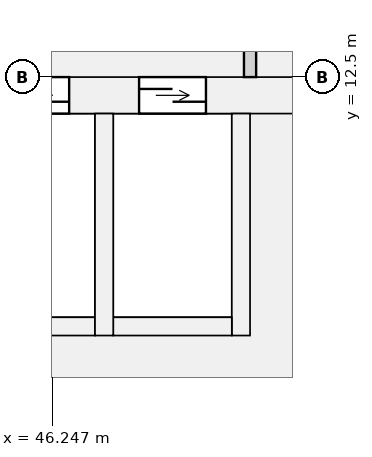
"""IFC4 building model, lengths in metres.
Left out: names, types, materials, properties, quantities, classifications, styles, units other than length and angle.
Written with IfcOpenShell. Run it as: python <this file> out.ifc"""

import sys

from ifc_helpers import new_model, si_unit, direction, frame, frame_2d, origin, place, context, subcontext, project, spatial, rectangle, extrude, element, fill, save


model = new_model("IFC4")
c1 = context("Model", 3, precision=1e-05, world=origin(), true_north=direction((0.0, 1.0)))
c2 = subcontext(c1, "Body", "Model", "MODEL_VIEW")
j1 = project(units=[si_unit("LENGTHUNIT", "METRE"), si_unit("PLANEANGLEUNIT", "RADIAN")], contexts=[c1])
p1 = place(None, origin())
s1 = spatial("IfcSite", under=j1, at=p1, CompositionType="ELEMENT")
p2 = place(p1, origin())
s2 = spatial("IfcBuilding", under=s1, at=p2, CompositionType="ELEMENT")
p3 = place(p2, frame((0.0, 0.0, 77.25)))
s3 = spatial("IfcBuildingStorey", under=s2, at=p3, CompositionType="ELEMENT", Elevation=77.25)
p4 = place(p3, frame((18.8, 12.2, 0.0), z_axis=(0.0, 0.0, 1.0), x_axis=(1.0, 0.0, 0.0)))
e1 = element("IfcWall", 1, at=p4, inside=s3, PredefinedType="SHEAR", context=c2, shape_type="SweptSolid", body=[
    extrude(rectangle(XDim=34.4, YDim=0.6, at=frame_2d((17.2, 0.0))), origin(), (0.0, 0.0, 1.0), 6.3),
])
p5 = place(p4, frame((4.675, 0.0, 0.0)))
e2 = element("IfcOpeningElement", 2, at=p5, cuts=e1, PredefinedType="OPENING", context=c2, shape_type="SweptSolid", body=[
    extrude(rectangle(XDim=1.2, YDim=2.1, at=frame_2d((0.6, 1.05))), frame((0.0, 0.31, 0.0), z_axis=(0.0, -1.0, 0.0), x_axis=(1.0, 0.0, 0.0)), (0.0, 0.0, 1.0), 0.62),
])
p6 = place(p4, frame((7.525, 0.0, 0.0)))
e3 = element("IfcOpeningElement", 3, at=p6, cuts=e1, PredefinedType="OPENING", context=c2, shape_type="SweptSolid", body=[
    extrude(rectangle(XDim=1.2, YDim=2.1, at=frame_2d((0.6, 1.05))), frame((0.0, 0.31, 0.0), z_axis=(0.0, -1.0, 0.0), x_axis=(1.0, 0.0, 0.0)), (0.0, 0.0, 1.0), 0.62),
])
p7 = place(p4, frame((10.375, 0.0, 0.0)))
e4 = element("IfcOpeningElement", 4, at=p7, cuts=e1, PredefinedType="OPENING", context=c2, shape_type="SweptSolid", body=[
    extrude(rectangle(XDim=1.2, YDim=2.1, at=frame_2d((0.6, 1.05))), frame((0.0, 0.31, 0.0), z_axis=(0.0, -1.0, 0.0), x_axis=(1.0, 0.0, 0.0)), (0.0, 0.0, 1.0), 0.62),
])
p8 = place(p4, frame((13.225, 0.0, 0.0)))
e5 = element("IfcOpeningElement", 5, at=p8, cuts=e1, PredefinedType="OPENING", context=c2, shape_type="SweptSolid", body=[
    extrude(rectangle(XDim=1.2, YDim=2.1, at=frame_2d((0.6, 1.05))), frame((0.0, 0.31, 0.0), z_axis=(0.0, -1.0, 0.0), x_axis=(1.0, 0.0, 0.0)), (0.0, 0.0, 1.0), 0.62),
])
p9 = place(p4, frame((16.075, 0.0, 0.0)))
e6 = element("IfcOpeningElement", 6, at=p9, cuts=e1, PredefinedType="OPENING", context=c2, shape_type="SweptSolid", body=[
    extrude(rectangle(XDim=1.2, YDim=2.1, at=frame_2d((0.6, 1.05))), frame((0.0, 0.31, 0.0), z_axis=(0.0, -1.0, 0.0), x_axis=(1.0, 0.0, 0.0)), (0.0, 0.0, 1.0), 0.62),
])
p10 = place(p4, frame((18.925, 0.0, 0.0)))
e7 = element("IfcOpeningElement", 7, at=p10, cuts=e1, PredefinedType="OPENING", context=c2, shape_type="SweptSolid", body=[
    extrude(rectangle(XDim=1.2, YDim=2.1, at=frame_2d((0.6, 1.05))), frame((0.0, 0.31, 0.0), z_axis=(0.0, -1.0, 0.0), x_axis=(1.0, 0.0, 0.0)), (0.0, 0.0, 1.0), 0.62),
])
p11 = place(p4, frame((21.775, 0.0, 0.0)))
e8 = element("IfcOpeningElement", 8, at=p11, cuts=e1, PredefinedType="OPENING", context=c2, shape_type="SweptSolid", body=[
    extrude(rectangle(XDim=1.2, YDim=2.1, at=frame_2d((0.6, 1.05))), frame((0.0, 0.31, 0.0), z_axis=(0.0, -1.0, 0.0), x_axis=(1.0, 0.0, 0.0)), (0.0, 0.0, 1.0), 0.62),
])
p12 = place(p4, frame((24.375, 0.0, 0.0)))
e9 = element("IfcOpeningElement", 9, at=p12, cuts=e1, PredefinedType="OPENING", context=c2, shape_type="SweptSolid", body=[
    extrude(rectangle(XDim=1.1, YDim=2.1, at=frame_2d((0.55, 1.05))), frame((0.0, 0.31, 0.0), z_axis=(0.0, -1.0, 0.0), x_axis=(1.0, 0.0, 0.0)), (0.0, 0.0, 1.0), 0.62),
])
p13 = place(p4, frame((26.625, 0.0, 0.0)))
e10 = element("IfcOpeningElement", 10, at=p13, cuts=e1, PredefinedType="OPENING", context=c2, shape_type="SweptSolid", body=[
    extrude(rectangle(XDim=1.1, YDim=2.1, at=frame_2d((0.55, 1.05))), frame((0.0, 0.31, 0.0), z_axis=(0.0, -1.0, 0.0), x_axis=(1.0, 0.0, 0.0)), (0.0, 0.0, 1.0), 0.62),
])
p14 = place(p4, frame((28.875, 0.0, 0.0)))
e11 = element("IfcOpeningElement", 11, at=p14, cuts=e1, PredefinedType="OPENING", context=c2, shape_type="SweptSolid", body=[
    extrude(rectangle(XDim=1.1, YDim=2.1, at=frame_2d((0.55, 1.05))), frame((0.0, 0.31, 0.0), z_axis=(0.0, -1.0, 0.0), x_axis=(1.0, 0.0, 0.0)), (0.0, 0.0, 1.0), 0.62),
])
p15 = place(p4, frame((1.35, 0.0, 0.0)))
e12 = element("IfcOpeningElement", 12, at=p15, cuts=e1, PredefinedType="OPENING", context=c2, shape_type="SweptSolid", body=[
    extrude(rectangle(XDim=1.2, YDim=2.1, at=frame_2d((0.6, 1.05))), frame((0.0, 0.31, 0.0), z_axis=(0.0, -1.0, 0.0), x_axis=(1.0, 0.0, 0.0)), (0.0, 0.0, 1.0), 0.62),
])
p16 = place(p4, frame((31.85, 0.0, 0.0)))
e13 = element("IfcOpeningElement", 13, at=p16, cuts=e1, PredefinedType="OPENING", context=c2, shape_type="SweptSolid", body=[
    extrude(rectangle(XDim=1.2, YDim=2.1, at=frame_2d((0.6, 1.05))), frame((0.0, 0.31, 0.0), z_axis=(0.0, -1.0, 0.0), x_axis=(1.0, 0.0, 0.0)), (0.0, 0.0, 1.0), 0.62),
])
for number, where, z_axis, x_axis in (
    (14, (45.0, 8.4, 0.0), (0.0, 0.0, 1.0), (1.0, 0.0, 0.0)),
    (15, (47.25, 8.4, 0.0), (0.0, 0.0, 1.0), (1.0, 0.0, 0.0)),
):
    element("IfcWall", number, at=place(p3, frame(where, z_axis=z_axis, x_axis=x_axis)), inside=s3, PredefinedType="SHEAR", context=c2, shape_type="SweptSolid", body=[
        extrude(rectangle(XDim=1.95, YDim=0.3, at=frame_2d((0.975, 0.0))), origin(), (0.0, 0.0, 1.0), 6.3),
    ])
for number, where, z_axis, x_axis in (
    (16, (47.1, 8.25, 0.0), (0.0, 0.0, 1.0), (0.0, 1.0, 0.0)),
    (17, (49.35, 8.25, 0.0), (0.0, 0.0, 1.0), (0.0, 1.0, 0.0)),
):
    element("IfcWall", number, at=place(p3, frame(where, z_axis=z_axis, x_axis=x_axis)), inside=s3, PredefinedType="SHEAR", context=c2, shape_type="SweptSolid", body=[
        extrude(rectangle(XDim=3.65, YDim=0.3, at=frame_2d((1.825, 0.0))), origin(), (0.0, 0.0, 1.0), 6.3),
    ])
p17 = place(p3, frame((49.5, 12.5, 0.0), z_axis=(0.0, 0.0, 1.0), x_axis=(0.0, 1.0, 0.0)))
e18 = element("IfcWall", 18, at=p17, inside=s3, PredefinedType="PARTITIONING", context=c2, shape_type="SweptSolid", body=[
    extrude(rectangle(XDim=3.4, YDim=0.2, at=frame_2d((1.7, 0.0))), origin(), (0.0, 0.0, 1.0), 5.98),
])
p18 = place(p17, frame((1.15, 0.0, 0.0)))
e19 = element("IfcOpeningElement", 19, at=p18, cuts=e18, PredefinedType="OPENING", context=c2, shape_type="SweptSolid", body=[
    extrude(rectangle(XDim=1.1, YDim=2.1, at=frame_2d((0.55, 1.05))), frame((0.0, 0.11, 0.0), z_axis=(0.0, -1.0, 0.0), x_axis=(1.0, 0.0, 0.0)), (0.0, 0.0, 1.0), 0.22),
])
p19 = place(p13, origin())
e20 = element("IfcDoor", 20, at=p19, inside=s3, OperationType="DOUBLE_DOOR_SLIDING", PredefinedType="DOOR", context=c2, shape_type="SweptSolid", body=[
    extrude(rectangle(XDim=1.1, YDim=2.1, at=frame_2d((0.55, 1.05))), frame((0.0, 0.025, 0.0), z_axis=(0.0, -1.0, 0.0), x_axis=(1.0, 0.0, 0.0)), (0.0, 0.0, 1.0), 0.05),
])
fill(e10, e20)
p20 = place(p14, origin())
e21 = element("IfcDoor", 21, at=p20, inside=s3, OperationType="DOUBLE_DOOR_SLIDING", PredefinedType="DOOR", context=c2, shape_type="SweptSolid", body=[
    extrude(rectangle(XDim=1.1, YDim=2.1, at=frame_2d((0.55, 1.05))), frame((0.0, 0.025, 0.0), z_axis=(0.0, -1.0, 0.0), x_axis=(1.0, 0.0, 0.0)), (0.0, 0.0, 1.0), 0.05),
])
fill(e11, e21)
save(model, sys.argv[1])
